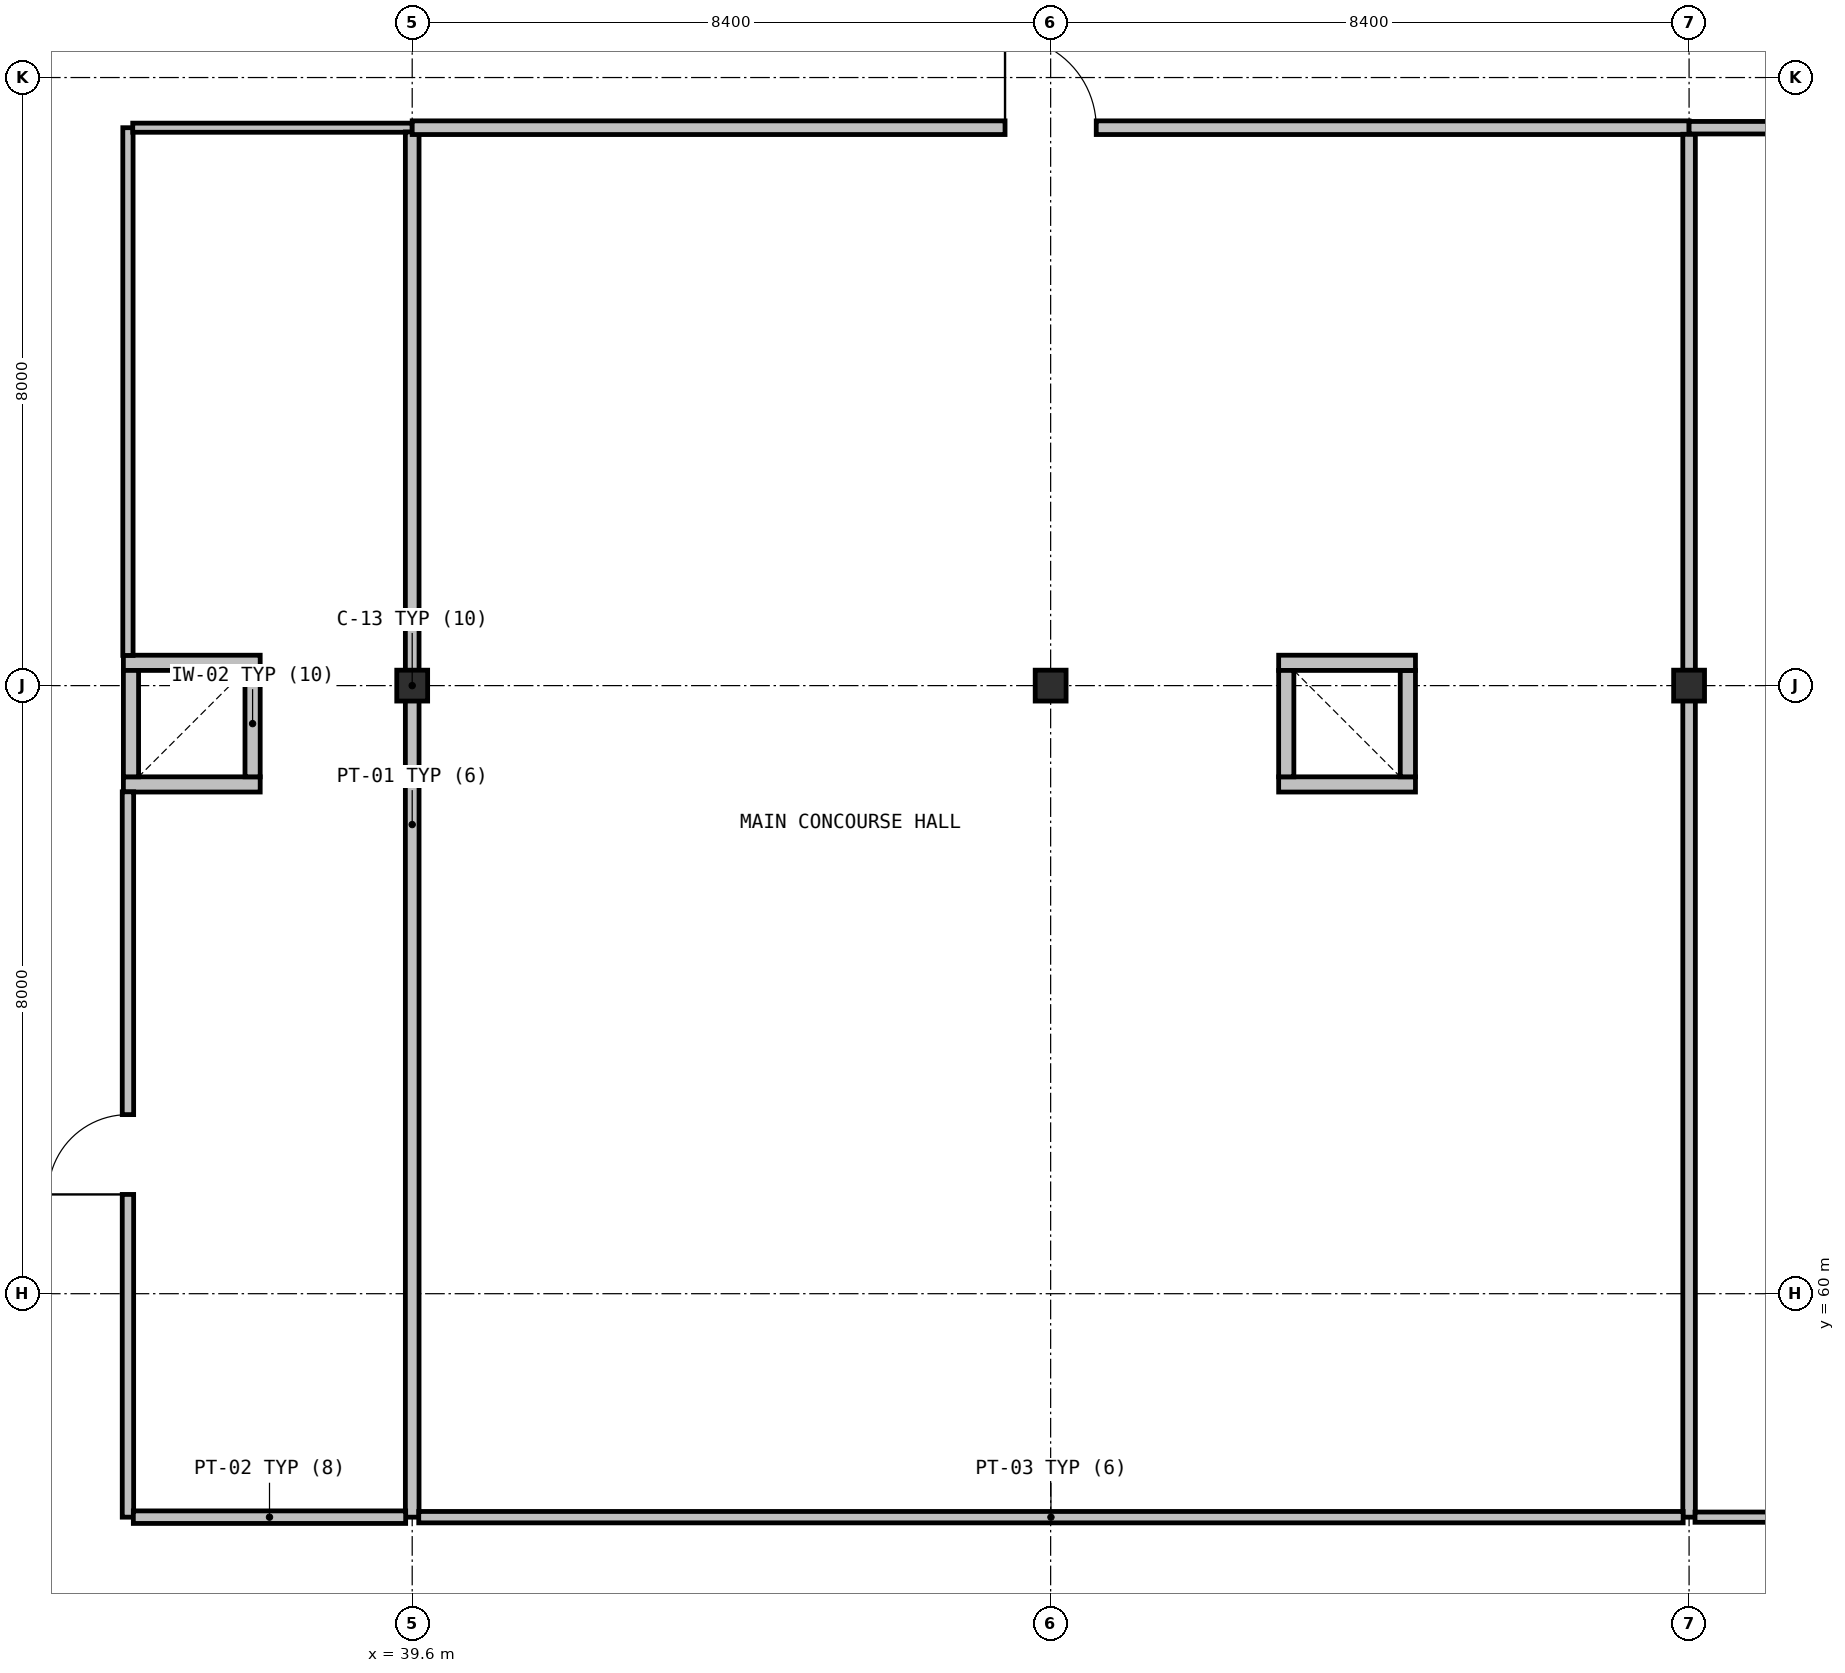
"""IFC4 building model, lengths in metres.
Left out: names, types, materials, properties, quantities, classifications, styles, units other than length and angle.
Written with IfcOpenShell. Run it as: python <this file> out.ifc"""

import sys

from ifc_helpers import new_model, si_unit, direction, frame, frame_2d, origin, origin_2d, place, context, subcontext, project, spatial, rectangle, hollow_circle, extrude, element, fill, save


model = new_model("IFC4")
c1 = context("Model", 3, precision=1e-05, world=origin(), true_north=direction((0.0, 1.0)))
c2 = subcontext(c1, "Body", "Model", "MODEL_VIEW")
j1 = project(units=[si_unit("LENGTHUNIT", "METRE"), si_unit("PLANEANGLEUNIT", "RADIAN")], contexts=[c1])
p1 = place(None, origin())
s1 = spatial("IfcSite", under=j1, at=p1, CompositionType="ELEMENT")
p2 = place(p1, origin())
s2 = spatial("IfcBuilding", under=s1, at=p2, CompositionType="ELEMENT")
p3 = place(p2, origin())
s3 = spatial("IfcBuildingStorey", under=s2, at=p3, CompositionType="ELEMENT", Elevation=0.0)
for number, where, z_axis, x_axis in (
    (1, (39.6, 68.0, 0.0), (0.0, 0.0, 1.0), (1.0, 0.0, 0.0)),
    (2, (48.0, 68.0, 0.0), (0.0, 0.0, 1.0), (1.0, 0.0, 0.0)),
    (3, (56.4, 68.0, 0.0), (0.0, 0.0, 1.0), (1.0, 0.0, 0.0)),
):
    element("IfcColumn", number, at=place(p3, frame(where, z_axis=z_axis, x_axis=x_axis)), inside=s3, PredefinedType="COLUMN", context=c2, shape_type="SweptSolid", body=[
        extrude(hollow_circle(Radius=0.203, WallThickness=0.016, at=origin_2d()), origin(), (0.0, 0.0, 1.0), 5.4),
    ])
p4 = place(p3, frame((51.0, 66.7, 0.0), z_axis=(0.0, 0.0, 1.0), x_axis=(1.0, 0.0, 0.0)))
e4 = element("IfcWall", 4, at=p4, inside=s3, PredefinedType="SOLIDWALL", context=c2, shape_type="SweptSolid", body=[
    extrude(rectangle(XDim=1.8, YDim=0.2, at=frame_2d((0.9, 0.0))), origin(), (0.0, 0.0, 1.0), 5.08),
])
p5 = place(p3, frame((52.7, 66.8, 0.0), z_axis=(0.0, 0.0, 1.0), x_axis=(0.0, 1.0, 0.0)))
e5 = element("IfcWall", 5, at=p5, inside=s3, PredefinedType="SOLIDWALL", context=c2, shape_type="SweptSolid", body=[
    extrude(rectangle(XDim=1.4, YDim=0.2, at=frame_2d((0.7, 0.0))), origin(), (0.0, 0.0, 1.0), 5.08),
])
p6 = place(p3, frame((52.8, 68.3, 0.0), z_axis=(0.0, 0.0, 1.0), x_axis=(-1.0, 0.0, 0.0)))
e6 = element("IfcWall", 6, at=p6, inside=s3, PredefinedType="SOLIDWALL", context=c2, shape_type="SweptSolid", body=[
    extrude(rectangle(XDim=1.8, YDim=0.2, at=frame_2d((0.9, 0.0))), origin(), (0.0, 0.0, 1.0), 5.08),
])
p7 = place(p3, frame((51.1, 68.2, 0.0), z_axis=(0.0, 0.0, 1.0), x_axis=(0.0, -1.0, 0.0)))
e7 = element("IfcWall", 7, at=p7, inside=s3, PredefinedType="SOLIDWALL", context=c2, shape_type="SweptSolid", body=[
    extrude(rectangle(XDim=1.4, YDim=0.2, at=frame_2d((0.7, 0.0))), origin(), (0.0, 0.0, 1.0), 5.08),
])
p8 = place(p3, frame((35.8, 66.7, 0.0), z_axis=(0.0, 0.0, 1.0), x_axis=(1.0, 0.0, 0.0)))
e8 = element("IfcWall", 8, at=p8, inside=s3, PredefinedType="SOLIDWALL", context=c2, shape_type="SweptSolid", body=[
    extrude(rectangle(XDim=1.8, YDim=0.2, at=frame_2d((0.9, 0.0))), origin(), (0.0, 0.0, 1.0), 5.08),
])
p9 = place(p3, frame((37.5, 66.8, 0.0), z_axis=(0.0, 0.0, 1.0), x_axis=(0.0, 1.0, 0.0)))
e9 = element("IfcWall", 9, at=p9, inside=s3, PredefinedType="SOLIDWALL", context=c2, shape_type="SweptSolid", body=[
    extrude(rectangle(XDim=1.4, YDim=0.2, at=frame_2d((0.7, 0.0))), origin(), (0.0, 0.0, 1.0), 5.08),
])
p10 = place(p3, frame((37.6, 68.3, 0.0), z_axis=(0.0, 0.0, 1.0), x_axis=(-1.0, 0.0, 0.0)))
e10 = element("IfcWall", 10, at=p10, inside=s3, PredefinedType="SOLIDWALL", context=c2, shape_type="SweptSolid", body=[
    extrude(rectangle(XDim=1.8, YDim=0.2, at=frame_2d((0.9, 0.0))), origin(), (0.0, 0.0, 1.0), 5.08),
])
p11 = place(p3, frame((35.9, 68.2, 0.0), z_axis=(0.0, 0.0, 1.0), x_axis=(0.0, -1.0, 0.0)))
e11 = element("IfcWall", 11, at=p11, inside=s3, PredefinedType="SOLIDWALL", context=c2, shape_type="SweptSolid", body=[
    extrude(rectangle(XDim=1.4, YDim=0.2, at=frame_2d((0.7, 0.0))), origin(), (0.0, 0.0, 1.0), 5.08),
])
p12 = place(p3, frame((35.86, 57.06, 0.0), z_axis=(0.0, 0.0, 1.0), x_axis=(0.0, 1.0, 0.0)))
e12 = element("IfcWall", 12, at=p12, inside=s3, PredefinedType="PARTITIONING", context=c2, shape_type="SweptSolid", body=[
    extrude(rectangle(XDim=9.543, YDim=0.15, at=frame_2d((4.771, 0.0))), origin(), (0.0, 0.0, 1.0), 5.08),
])
p13 = place(p12, frame((4.246, 0.0, 0.0)))
e13 = element("IfcOpeningElement", 13, at=p13, cuts=e12, PredefinedType="OPENING", context=c2, shape_type="SweptSolid", body=[
    extrude(rectangle(XDim=1.05, YDim=2.15, at=frame_2d((0.525, 1.075))), frame((0.0, 0.085, 0.0), z_axis=(0.0, -1.0, 0.0), x_axis=(1.0, 0.0, 0.0)), (0.0, 0.0, 1.0), 0.17),
])
p14 = place(p3, frame((35.86, 68.397, 0.0), z_axis=(0.0, 0.0, 1.0), x_axis=(0.0, 1.0, 0.0)))
e14 = element("IfcWall", 14, at=p14, inside=s3, PredefinedType="PARTITIONING", context=c2, shape_type="SweptSolid", body=[
    extrude(rectangle(XDim=6.943, YDim=0.135, at=frame_2d((3.472, 0.0))), origin(), (0.0, 0.0, 1.0), 5.08),
])
p15 = place(p3, frame((35.923, 75.34, 0.0), z_axis=(0.0, 0.0, 1.0), x_axis=(1.0, 0.0, 0.0)))
e15 = element("IfcWall", 15, at=p15, inside=s3, PredefinedType="PARTITIONING", context=c2, shape_type="SweptSolid", body=[
    extrude(rectangle(XDim=3.677, YDim=0.12, at=frame_2d((1.838, 0.0))), origin(), (0.0, 0.0, 1.0), 5.08),
])
p16 = place(p3, frame((39.6, 75.284, 0.0), z_axis=(0.0, 0.0, 1.0), x_axis=(0.0, -1.0, 0.0)))
e16 = element("IfcWall", 16, at=p16, inside=s3, PredefinedType="PARTITIONING", context=c2, shape_type="SweptSolid", body=[
    extrude(rectangle(XDim=18.224, YDim=0.18, at=frame_2d((9.112, 0.0))), origin(), (0.0, 0.0, 1.0), 4.33),
])
p17 = place(p3, frame((39.514, 57.06, 0.0), z_axis=(0.0, 0.0, 1.0), x_axis=(-1.0, 0.0, 0.0)))
e17 = element("IfcWall", 17, at=p17, inside=s3, PredefinedType="PARTITIONING", context=c2, shape_type="SweptSolid", body=[
    extrude(rectangle(XDim=3.583, YDim=0.165, at=frame_2d((1.792, 0.0))), origin(), (0.0, 0.0, 1.0), 5.08),
])
p18 = place(p3, frame((39.6, 75.34, 0.0), z_axis=(0.0, 0.0, 1.0), x_axis=(1.0, 0.0, 0.0)))
e18 = element("IfcWall", 18, at=p18, inside=s3, PredefinedType="PARTITIONING", context=c2, shape_type="SweptSolid", body=[
    extrude(rectangle(XDim=16.8, YDim=0.18, at=frame_2d((8.4, 0.0))), origin(), (0.0, 0.0, 1.0), 5.08),
])
p19 = place(p18, frame((7.8, 0.0, 0.0)))
e19 = element("IfcOpeningElement", 19, at=p19, cuts=e18, PredefinedType="OPENING", context=c2, shape_type="SweptSolid", body=[
    extrude(rectangle(XDim=1.2, YDim=2.15, at=frame_2d((0.6, 1.075))), frame((0.0, 0.1, 0.0), z_axis=(0.0, -1.0, 0.0), x_axis=(1.0, 0.0, 0.0)), (0.0, 0.0, 1.0), 0.2),
])
p20 = place(p3, frame((56.4, 75.254, 0.0), z_axis=(0.0, 0.0, 1.0), x_axis=(0.0, -1.0, 0.0)))
e20 = element("IfcWall", 20, at=p20, inside=s3, PredefinedType="PARTITIONING", context=c2, shape_type="SweptSolid", body=[
    extrude(rectangle(XDim=18.194, YDim=0.165, at=frame_2d((9.097, 0.0))), origin(), (0.0, 0.0, 1.0), 5.08),
])
p21 = place(p3, frame((56.322, 57.06, 0.0), z_axis=(0.0, 0.0, 1.0), x_axis=(-1.0, 0.0, 0.0)))
e21 = element("IfcWall", 21, at=p21, inside=s3, PredefinedType="PARTITIONING", context=c2, shape_type="SweptSolid", body=[
    extrude(rectangle(XDim=16.636, YDim=0.15, at=frame_2d((8.318, 0.0))), origin(), (0.0, 0.0, 1.0), 5.08),
])
p22 = place(p3, frame((56.4, 75.34, 0.0), z_axis=(0.0, 0.0, 1.0), x_axis=(1.0, 0.0, 0.0)))
e22 = element("IfcWall", 22, at=p22, inside=s3, PredefinedType="PARTITIONING", context=c2, shape_type="SweptSolid", body=[
    extrude(rectangle(XDim=8.4, YDim=0.165, at=frame_2d((4.2, 0.0))), origin(), (0.0, 0.0, 1.0), 5.08),
])
p23 = place(p22, frame((3.5, 0.0, 0.0)))
e23 = element("IfcOpeningElement", 23, at=p23, cuts=e22, PredefinedType="OPENING", context=c2, shape_type="SweptSolid", body=[
    extrude(rectangle(XDim=1.4, YDim=2.15, at=frame_2d((0.7, 1.075))), frame((0.0, 0.093, 0.0), z_axis=(0.0, -1.0, 0.0), x_axis=(1.0, 0.0, 0.0)), (0.0, 0.0, 1.0), 0.185),
])
p24 = place(p3, frame((64.729, 57.06, 0.0), z_axis=(0.0, 0.0, 1.0), x_axis=(-1.0, 0.0, 0.0)))
e24 = element("IfcWall", 24, at=p24, inside=s3, PredefinedType="PARTITIONING", context=c2, shape_type="SweptSolid", body=[
    extrude(rectangle(XDim=8.251, YDim=0.135, at=frame_2d((4.125, 0.0))), origin(), (0.0, 0.0, 1.0), 5.08),
])
p25 = place(p13, origin())
e25 = element("IfcDoor", 25, at=p25, inside=s3, OperationType="SINGLE_SWING_LEFT", PredefinedType="DOOR", context=c2, shape_type="SweptSolid", body=[
    extrude(rectangle(XDim=1.05, YDim=2.15, at=frame_2d((0.525, 1.075))), frame((0.0, 0.025, 0.0), z_axis=(0.0, -1.0, 0.0), x_axis=(1.0, 0.0, 0.0)), (0.0, 0.0, 1.0), 0.05),
])
fill(e13, e25)
p26 = place(p19, origin())
e26 = element("IfcDoor", 26, at=p26, inside=s3, OperationType="SINGLE_SWING_LEFT", PredefinedType="DOOR", context=c2, shape_type="SweptSolid", body=[
    extrude(rectangle(XDim=1.2, YDim=2.15, at=frame_2d((0.6, 1.075))), frame((0.0, 0.025, 0.0), z_axis=(0.0, -1.0, 0.0), x_axis=(1.0, 0.0, 0.0)), (0.0, 0.0, 1.0), 0.05),
])
fill(e19, e26)
save(model, sys.argv[1])
